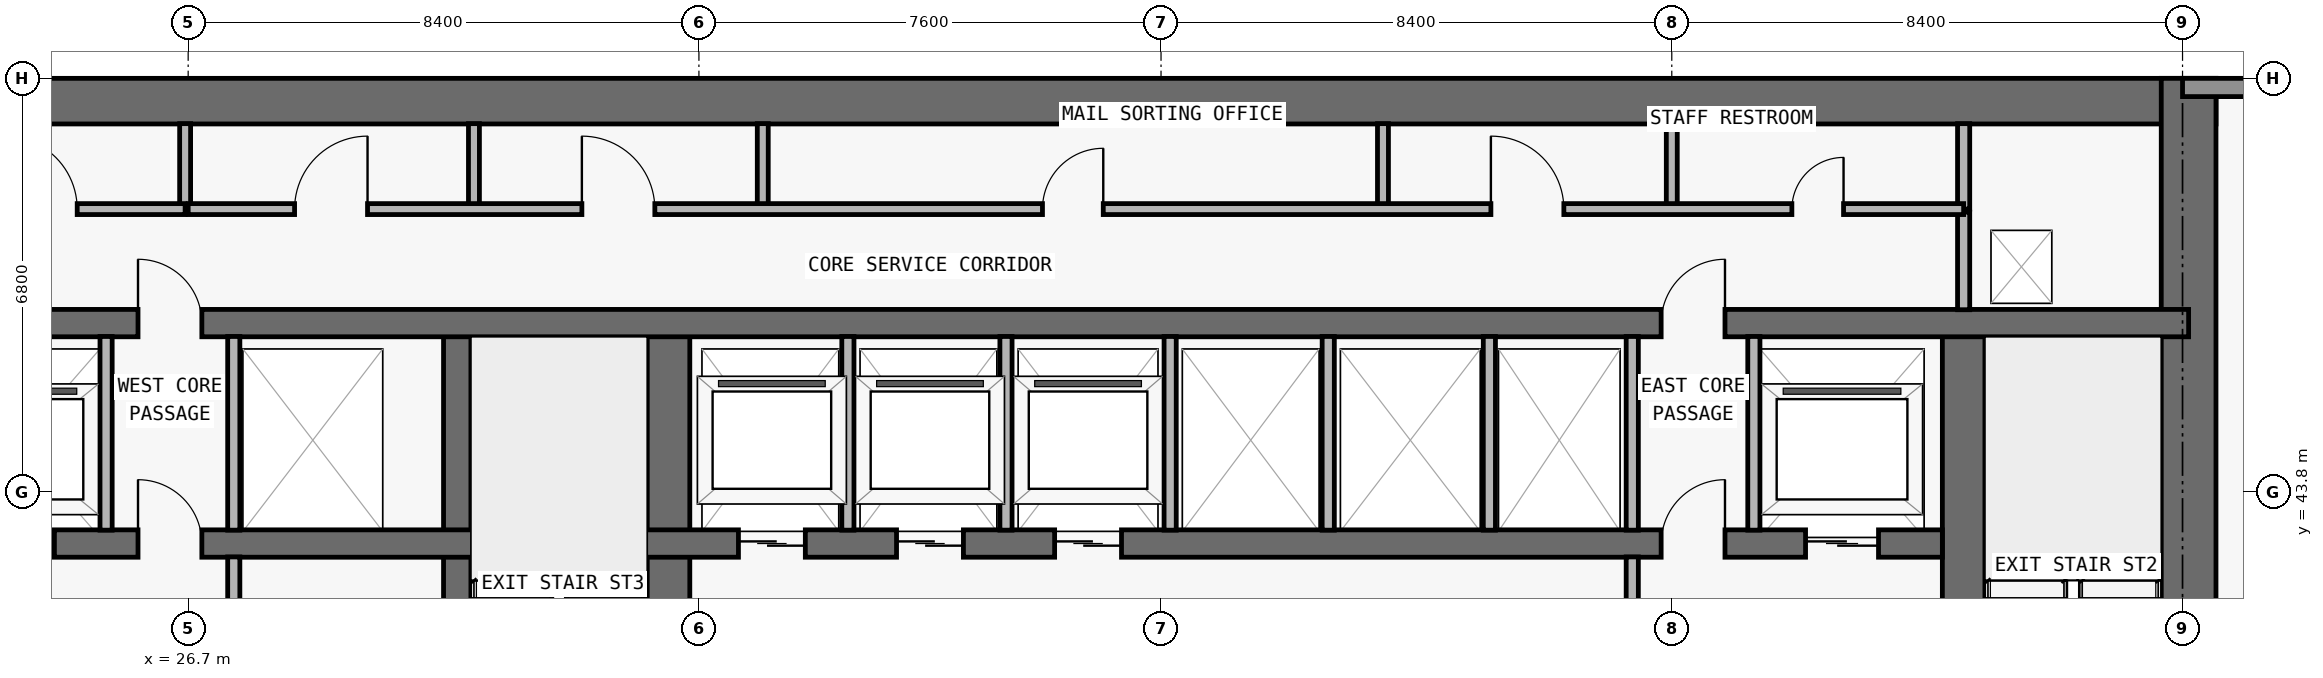
"""IFC4 building model, lengths in metres.
Left out: names, types, materials, properties, quantities, classifications, styles, units other than length and angle.
Written with IfcOpenShell. Run it as: python <this file> out.ifc"""

import sys

from ifc_helpers import new_model, si_unit, direction, frame, frame_2d, origin, place, context, subcontext, project, spatial, rectangle, extrude, element, fill, save


model = new_model("IFC4")
c1 = context("Model", 3, precision=1e-05, world=origin(), true_north=direction((0.0, 1.0)))
c2 = subcontext(c1, "Body", "Model", "MODEL_VIEW")
j1 = project(units=[si_unit("LENGTHUNIT", "METRE"), si_unit("PLANEANGLEUNIT", "RADIAN")], contexts=[c1])
p1 = place(None, origin())
s1 = spatial("IfcSite", under=j1, at=p1, CompositionType="ELEMENT")
p2 = place(p1, origin())
s2 = spatial("IfcBuilding", under=s1, at=p2, CompositionType="ELEMENT")
p3 = place(p2, frame((0.0, 0.0, 19.8)))
s3 = spatial("IfcBuildingStorey", under=s2, at=p3, CompositionType="ELEMENT", Elevation=19.8)
p4 = place(p3, frame((17.75, 50.225, 0.0), z_axis=(0.0, 0.0, 1.0), x_axis=(1.0, 0.0, 0.0)))
e1 = element("IfcWall", 1, at=p4, inside=s3, PredefinedType="SHEAR", context=c2, shape_type="SweptSolid", body=[
    extrude(rectangle(XDim=42.3, YDim=0.75, at=frame_2d((21.15, 0.0))), origin(), (0.0, 0.0, 1.0), 4.45),
])
p5 = place(p3, frame((59.6, 36.45, 0.0), z_axis=(0.0, 0.0, 1.0), x_axis=(0.0, 1.0, 0.0)))
e2 = element("IfcWall", 2, at=p5, inside=s3, PredefinedType="SHEAR", context=c2, shape_type="SweptSolid", body=[
    extrude(rectangle(XDim=14.15, YDim=0.9, at=frame_2d((7.075, 0.0))), origin(), (0.0, 0.0, 1.0), 4.45),
])
p6 = place(p3, frame((55.9, 36.9, 0.0), z_axis=(0.0, 0.0, 1.0), x_axis=(0.0, 1.0, 0.0)))
e3 = element("IfcWall", 3, at=p6, inside=s3, PredefinedType="SHEAR", context=c2, shape_type="SweptSolid", body=[
    extrude(rectangle(XDim=9.675, YDim=0.7, at=frame_2d((4.837, 0.0))), origin(), (0.0, 0.0, 1.0), 4.45),
])
p7 = place(p6, frame((0.65, 0.0, 0.0)))
e4 = element("IfcOpeningElement", 4, at=p7, cuts=e3, PredefinedType="OPENING", context=c2, shape_type="SweptSolid", body=[
    extrude(rectangle(XDim=1.1, YDim=2.15, at=frame_2d((0.55, 1.075))), frame((0.0, 0.36, 0.0), z_axis=(0.0, -1.0, 0.0), x_axis=(1.0, 0.0, 0.0)), (0.0, 0.0, 1.0), 0.72),
])
p8 = place(p3, frame((31.125, 36.9, 0.0), z_axis=(0.0, 0.0, 1.0), x_axis=(0.0, 1.0, 0.0)))
e5 = element("IfcWall", 5, at=p8, inside=s3, PredefinedType="SHEAR", context=c2, shape_type="SweptSolid", body=[
    extrude(rectangle(XDim=9.675, YDim=0.45, at=frame_2d((4.837, 0.0))), origin(), (0.0, 0.0, 1.0), 4.45),
])
p9 = place(p3, frame((34.6, 36.9, 0.0), z_axis=(0.0, 0.0, 1.0), x_axis=(0.0, 1.0, 0.0)))
e6 = element("IfcWall", 6, at=p9, inside=s3, PredefinedType="SHEAR", context=c2, shape_type="SweptSolid", body=[
    extrude(rectangle(XDim=9.675, YDim=0.7, at=frame_2d((4.837, 0.0))), origin(), (0.0, 0.0, 1.0), 4.45),
])
p10 = place(p3, frame((22.25, 42.95, 0.0), z_axis=(0.0, 0.0, 1.0), x_axis=(1.0, 0.0, 0.0)))
e7 = element("IfcWall", 7, at=p10, inside=s3, PredefinedType="SHEAR", context=c2, shape_type="SweptSolid", body=[
    extrude(rectangle(XDim=33.3, YDim=0.45, at=frame_2d((16.65, 0.0))), origin(), (0.0, 0.0, 1.0), 4.45),
])
p11 = place(p10, frame((1.05, 0.0, 0.0)))
e8 = element("IfcOpeningElement", 8, at=p11, cuts=e7, PredefinedType="OPENING", context=c2, shape_type="SweptSolid", body=[
    extrude(rectangle(XDim=1.2, YDim=2.2, at=frame_2d((0.6, 1.1))), frame((0.0, 0.235, 0.0), z_axis=(0.0, -1.0, 0.0), x_axis=(1.0, 0.0, 0.0)), (0.0, 0.0, 1.0), 0.47),
])
p12 = place(p10, frame((31.05, 0.0, 0.0)))
e9 = element("IfcOpeningElement", 9, at=p12, cuts=e7, PredefinedType="OPENING", context=c2, shape_type="SweptSolid", body=[
    extrude(rectangle(XDim=1.2, YDim=2.2, at=frame_2d((0.6, 1.1))), frame((0.0, 0.235, 0.0), z_axis=(0.0, -1.0, 0.0), x_axis=(1.0, 0.0, 0.0)), (0.0, 0.0, 1.0), 0.47),
])
p13 = place(p10, frame((13.5, 0.0, 0.0)))
e10 = element("IfcOpeningElement", 10, at=p13, cuts=e7, PredefinedType="OPENING", context=c2, shape_type="SweptSolid", body=[
    extrude(rectangle(XDim=1.1, YDim=2.2, at=frame_2d((0.55, 1.1))), frame((0.0, 0.235, 0.0), z_axis=(0.0, -1.0, 0.0), x_axis=(1.0, 0.0, 0.0)), (0.0, 0.0, 1.0), 0.47),
])
p14 = place(p10, frame((16.1, 0.0, 0.0)))
e11 = element("IfcOpeningElement", 11, at=p14, cuts=e7, PredefinedType="OPENING", context=c2, shape_type="SweptSolid", body=[
    extrude(rectangle(XDim=1.1, YDim=2.2, at=frame_2d((0.55, 1.1))), frame((0.0, 0.235, 0.0), z_axis=(0.0, -1.0, 0.0), x_axis=(1.0, 0.0, 0.0)), (0.0, 0.0, 1.0), 0.47),
])
p15 = place(p10, frame((18.7, 0.0, 0.0)))
e12 = element("IfcOpeningElement", 12, at=p15, cuts=e7, PredefinedType="OPENING", context=c2, shape_type="SweptSolid", body=[
    extrude(rectangle(XDim=1.1, YDim=2.2, at=frame_2d((0.55, 1.1))), frame((0.0, 0.235, 0.0), z_axis=(0.0, -1.0, 0.0), x_axis=(1.0, 0.0, 0.0)), (0.0, 0.0, 1.0), 0.47),
])
p16 = place(p10, frame((3.625, 0.0, 0.0)))
e13 = element("IfcOpeningElement", 13, at=p16, cuts=e7, PredefinedType="OPENING", context=c2, shape_type="SweptSolid", body=[
    extrude(rectangle(XDim=1.05, YDim=2.15, at=frame_2d((0.525, 1.075))), frame((0.0, 0.235, 0.0), z_axis=(0.0, -1.0, 0.0), x_axis=(1.0, 0.0, 0.0)), (0.0, 0.0, 1.0), 0.47),
])
p17 = place(p10, frame((28.675, 0.0, 0.0)))
e14 = element("IfcOpeningElement", 14, at=p17, cuts=e7, PredefinedType="OPENING", context=c2, shape_type="SweptSolid", body=[
    extrude(rectangle(XDim=1.05, YDim=2.15, at=frame_2d((0.525, 1.075))), frame((0.0, 0.235, 0.0), z_axis=(0.0, -1.0, 0.0), x_axis=(1.0, 0.0, 0.0)), (0.0, 0.0, 1.0), 0.47),
])
p18 = place(p3, frame((18.2, 46.575, 0.0), z_axis=(0.0, 0.0, 1.0), x_axis=(1.0, 0.0, 0.0)))
e15 = element("IfcWall", 15, at=p18, inside=s3, PredefinedType="SHEAR", context=c2, shape_type="SweptSolid", body=[
    extrude(rectangle(XDim=41.4, YDim=0.45, at=frame_2d((20.7, 0.0))), origin(), (0.0, 0.0, 1.0), 4.45),
])
p19 = place(p18, frame((7.675, 0.0, 0.0)))
e16 = element("IfcOpeningElement", 16, at=p19, cuts=e15, PredefinedType="OPENING", context=c2, shape_type="SweptSolid", body=[
    extrude(rectangle(XDim=1.05, YDim=2.15, at=frame_2d((0.525, 1.075))), frame((0.0, 0.235, 0.0), z_axis=(0.0, -1.0, 0.0), x_axis=(1.0, 0.0, 0.0)), (0.0, 0.0, 1.0), 0.47),
])
p20 = place(p18, frame((32.725, 0.0, 0.0)))
e17 = element("IfcOpeningElement", 17, at=p20, cuts=e15, PredefinedType="OPENING", context=c2, shape_type="SweptSolid", body=[
    extrude(rectangle(XDim=1.05, YDim=2.15, at=frame_2d((0.525, 1.075))), frame((0.0, 0.235, 0.0), z_axis=(0.0, -1.0, 0.0), x_axis=(1.0, 0.0, 0.0)), (0.0, 0.0, 1.0), 0.47),
])
p21 = place(p3, frame((59.5, 50.45, 0.0), z_axis=(0.0, 0.0, 1.0), x_axis=(1.0, 0.0, 0.0)))
e18 = element("IfcWall", 18, at=p21, inside=s3, PredefinedType="STANDARD", context=c2, shape_type="SweptSolid", body=[
    extrude(rectangle(XDim=14.65, YDim=0.3, at=frame_2d((7.325, 0.0))), origin(), (0.0, 0.0, 1.0), 4.45),
])
p22 = place(p21, frame((6.225, 0.0, 0.85)))
e19 = element("IfcOpeningElement", 19, at=p22, cuts=e18, PredefinedType="OPENING", context=c2, shape_type="SweptSolid", body=[
    extrude(rectangle(XDim=2.2, YDim=1.55, at=frame_2d((1.1, 0.775))), frame((0.0, 0.16, 0.0), z_axis=(0.0, -1.0, 0.0), x_axis=(1.0, 0.0, 0.0)), (0.0, 0.0, 1.0), 0.32),
])
p23 = place(p3, frame((25.35, 43.17, 0.0), z_axis=(0.0, 0.0, 1.0), x_axis=(0.0, 1.0, 0.0)))
e20 = element("IfcWall", 20, at=p23, inside=s3, PredefinedType="PARTITIONING", context=c2, shape_type="SweptSolid", body=[
    extrude(rectangle(XDim=3.185, YDim=0.2, at=frame_2d((1.593, 0.0))), origin(), (0.0, 0.0, 1.0), 4.45),
])
p24 = place(p3, frame((26.65, 48.45, 0.0), z_axis=(0.0, 0.0, 1.0), x_axis=(0.0, 1.0, 0.0)))
e21 = element("IfcWall", 21, at=p24, inside=s3, PredefinedType="PARTITIONING", context=c2, shape_type="SweptSolid", body=[
    extrude(rectangle(XDim=1.405, YDim=0.18, at=frame_2d((0.703, 0.0))), origin(), (0.0, 0.0, 1.0), 4.45),
])
p25 = place(p3, frame((27.45, 37.345, 0.0), z_axis=(0.0, 0.0, 1.0), x_axis=(0.0, 1.0, 0.0)))
e22 = element("IfcWall", 22, at=p25, inside=s3, PredefinedType="PARTITIONING", context=c2, shape_type="SweptSolid", body=[
    extrude(rectangle(XDim=5.385, YDim=0.2, at=frame_2d((2.692, 0.0))), origin(), (0.0, 0.0, 1.0), 4.45),
])
p26 = place(p3, frame((27.45, 43.17, 0.0), z_axis=(0.0, 0.0, 1.0), x_axis=(0.0, 1.0, 0.0)))
e23 = element("IfcWall", 23, at=p26, inside=s3, PredefinedType="PARTITIONING", context=c2, shape_type="SweptSolid", body=[
    extrude(rectangle(XDim=3.185, YDim=0.2, at=frame_2d((1.593, 0.0))), origin(), (0.0, 0.0, 1.0), 4.45),
])
for number, where, z_axis, x_axis in (
    (24, (31.4, 48.45, 0.0), (0.0, 0.0, 1.0), (0.0, 1.0, 0.0)),
    (25, (36.15, 48.45, 0.0), (0.0, 0.0, 1.0), (0.0, 1.0, 0.0)),
):
    element("IfcWall", number, at=place(p3, frame(where, z_axis=z_axis, x_axis=x_axis)), inside=s3, PredefinedType="PARTITIONING", context=c2, shape_type="SweptSolid", body=[
        extrude(rectangle(XDim=1.405, YDim=0.18, at=frame_2d((0.703, 0.0))), origin(), (0.0, 0.0, 1.0), 4.45),
    ])
for number, where, z_axis, x_axis in (
    (26, (37.55, 43.17, 0.0), (0.0, 0.0, 1.0), (0.0, 1.0, 0.0)),
    (27, (40.15, 43.17, 0.0), (0.0, 0.0, 1.0), (0.0, 1.0, 0.0)),
    (28, (42.85, 43.17, 0.0), (0.0, 0.0, 1.0), (0.0, 1.0, 0.0)),
    (29, (45.45, 43.17, 0.0), (0.0, 0.0, 1.0), (0.0, 1.0, 0.0)),
):
    element("IfcWall", number, at=place(p3, frame(where, z_axis=z_axis, x_axis=x_axis)), inside=s3, PredefinedType="PARTITIONING", context=c2, shape_type="SweptSolid", body=[
        extrude(rectangle(XDim=3.185, YDim=0.2, at=frame_2d((1.593, 0.0))), origin(), (0.0, 0.0, 1.0), 4.45),
    ])
p27 = place(p3, frame((46.35, 48.45, 0.0), z_axis=(0.0, 0.0, 1.0), x_axis=(0.0, 1.0, 0.0)))
e30 = element("IfcWall", 30, at=p27, inside=s3, PredefinedType="PARTITIONING", context=c2, shape_type="SweptSolid", body=[
    extrude(rectangle(XDim=1.405, YDim=0.18, at=frame_2d((0.703, 0.0))), origin(), (0.0, 0.0, 1.0), 4.45),
])
p28 = place(p3, frame((48.1, 43.17, 0.0), z_axis=(0.0, 0.0, 1.0), x_axis=(0.0, 1.0, 0.0)))
e31 = element("IfcWall", 31, at=p28, inside=s3, PredefinedType="PARTITIONING", context=c2, shape_type="SweptSolid", body=[
    extrude(rectangle(XDim=3.185, YDim=0.2, at=frame_2d((1.593, 0.0))), origin(), (0.0, 0.0, 1.0), 4.45),
])
p29 = place(p3, frame((50.45, 37.345, 0.0), z_axis=(0.0, 0.0, 1.0), x_axis=(0.0, 1.0, 0.0)))
e32 = element("IfcWall", 32, at=p29, inside=s3, PredefinedType="PARTITIONING", context=c2, shape_type="SweptSolid", body=[
    extrude(rectangle(XDim=5.385, YDim=0.2, at=frame_2d((2.692, 0.0))), origin(), (0.0, 0.0, 1.0), 4.45),
])
p30 = place(p3, frame((50.45, 43.17, 0.0), z_axis=(0.0, 0.0, 1.0), x_axis=(0.0, 1.0, 0.0)))
e33 = element("IfcWall", 33, at=p30, inside=s3, PredefinedType="PARTITIONING", context=c2, shape_type="SweptSolid", body=[
    extrude(rectangle(XDim=3.185, YDim=0.2, at=frame_2d((1.593, 0.0))), origin(), (0.0, 0.0, 1.0), 4.45),
])
p31 = place(p3, frame((51.1, 48.45, 0.0), z_axis=(0.0, 0.0, 1.0), x_axis=(0.0, 1.0, 0.0)))
e34 = element("IfcWall", 34, at=p31, inside=s3, PredefinedType="PARTITIONING", context=c2, shape_type="SweptSolid", body=[
    extrude(rectangle(XDim=1.405, YDim=0.18, at=frame_2d((0.703, 0.0))), origin(), (0.0, 0.0, 1.0), 4.45),
])
p32 = place(p3, frame((52.45, 43.17, 0.0), z_axis=(0.0, 0.0, 1.0), x_axis=(0.0, 1.0, 0.0)))
e35 = element("IfcWall", 35, at=p32, inside=s3, PredefinedType="PARTITIONING", context=c2, shape_type="SweptSolid", body=[
    extrude(rectangle(XDim=3.185, YDim=0.2, at=frame_2d((1.593, 0.0))), origin(), (0.0, 0.0, 1.0), 4.45),
])
p33 = place(p3, frame((55.9, 46.795, 0.0), z_axis=(0.0, 0.0, 1.0), x_axis=(0.0, 1.0, 0.0)))
e36 = element("IfcWall", 36, at=p33, inside=s3, PredefinedType="PARTITIONING", context=c2, shape_type="SweptSolid", body=[
    extrude(rectangle(XDim=1.605, YDim=0.2, at=frame_2d((0.802, 0.0))), origin(), (0.0, 0.0, 1.0), 4.45),
])
p34 = place(p3, frame((55.9, 48.45, 0.0), z_axis=(0.0, 0.0, 1.0), x_axis=(0.0, 1.0, 0.0)))
e37 = element("IfcWall", 37, at=p34, inside=s3, PredefinedType="PARTITIONING", context=c2, shape_type="SweptSolid", body=[
    extrude(rectangle(XDim=1.405, YDim=0.2, at=frame_2d((0.703, 0.0))), origin(), (0.0, 0.0, 1.0), 4.45),
])
p35 = place(p3, frame((21.9, 48.45, 0.0), z_axis=(0.0, 0.0, 1.0), x_axis=(1.0, 0.0, 0.0)))
e38 = element("IfcWall", 38, at=p35, inside=s3, PredefinedType="PARTITIONING", context=c2, shape_type="SweptSolid", body=[
    extrude(rectangle(XDim=4.75, YDim=0.18, at=frame_2d((2.375, 0.0))), origin(), (0.0, 0.0, 1.0), 4.45),
])
p36 = place(p35, frame((1.775, 0.0, 0.0)))
e39 = element("IfcOpeningElement", 39, at=p36, cuts=e38, PredefinedType="OPENING", context=c2, shape_type="SweptSolid", body=[
    extrude(rectangle(XDim=1.2, YDim=2.2, at=frame_2d((0.6, 1.1))), frame((0.0, 0.1, 0.0), z_axis=(0.0, -1.0, 0.0), x_axis=(1.0, 0.0, 0.0)), (0.0, 0.0, 1.0), 0.2),
])
p37 = place(p3, frame((26.7, 48.45, 0.0), z_axis=(0.0, 0.0, 1.0), x_axis=(1.0, 0.0, 0.0)))
e40 = element("IfcWall", 40, at=p37, inside=s3, PredefinedType="PARTITIONING", context=c2, shape_type="SweptSolid", body=[
    extrude(rectangle(XDim=29.2, YDim=0.18, at=frame_2d((14.6, 0.0))), origin(), (0.0, 0.0, 1.0), 4.45),
])
p38 = place(p37, frame((1.75, 0.0, 0.0)))
e41 = element("IfcOpeningElement", 41, at=p38, cuts=e40, PredefinedType="OPENING", context=c2, shape_type="SweptSolid", body=[
    extrude(rectangle(XDim=1.2, YDim=2.2, at=frame_2d((0.6, 1.1))), frame((0.0, 0.1, 0.0), z_axis=(0.0, -1.0, 0.0), x_axis=(1.0, 0.0, 0.0)), (0.0, 0.0, 1.0), 0.2),
])
p39 = place(p37, frame((6.475, 0.0, 0.0)))
e42 = element("IfcOpeningElement", 42, at=p39, cuts=e40, PredefinedType="OPENING", context=c2, shape_type="SweptSolid", body=[
    extrude(rectangle(XDim=1.2, YDim=2.2, at=frame_2d((0.6, 1.1))), frame((0.0, 0.1, 0.0), z_axis=(0.0, -1.0, 0.0), x_axis=(1.0, 0.0, 0.0)), (0.0, 0.0, 1.0), 0.2),
])
p40 = place(p37, frame((14.05, 0.0, 0.0)))
e43 = element("IfcOpeningElement", 43, at=p40, cuts=e40, PredefinedType="OPENING", context=c2, shape_type="SweptSolid", body=[
    extrude(rectangle(XDim=1.0, YDim=2.2, at=frame_2d((0.5, 1.1))), frame((0.0, 0.1, 0.0), z_axis=(0.0, -1.0, 0.0), x_axis=(1.0, 0.0, 0.0)), (0.0, 0.0, 1.0), 0.2),
])
p41 = place(p37, frame((21.425, 0.0, 0.0)))
e44 = element("IfcOpeningElement", 44, at=p41, cuts=e40, PredefinedType="OPENING", context=c2, shape_type="SweptSolid", body=[
    extrude(rectangle(XDim=1.2, YDim=2.2, at=frame_2d((0.6, 1.1))), frame((0.0, 0.1, 0.0), z_axis=(0.0, -1.0, 0.0), x_axis=(1.0, 0.0, 0.0)), (0.0, 0.0, 1.0), 0.2),
])
p42 = place(p37, frame((26.375, 0.0, 0.0)))
e45 = element("IfcOpeningElement", 45, at=p42, cuts=e40, PredefinedType="OPENING", context=c2, shape_type="SweptSolid", body=[
    extrude(rectangle(XDim=0.85, YDim=2.1, at=frame_2d((0.425, 1.05))), frame((0.0, 0.1, 0.0), z_axis=(0.0, -1.0, 0.0), x_axis=(1.0, 0.0, 0.0)), (0.0, 0.0, 1.0), 0.2),
])
p43 = place(p11, origin())
e46 = element("IfcDoor", 46, at=p43, inside=s3, OperationType="DOUBLE_DOOR_SLIDING", PredefinedType="DOOR", context=c2, shape_type="SweptSolid", body=[
    extrude(rectangle(XDim=1.2, YDim=2.2, at=frame_2d((0.6, 1.1))), frame((0.0, 0.025, 0.0), z_axis=(0.0, -1.0, 0.0), x_axis=(1.0, 0.0, 0.0)), (0.0, 0.0, 1.0), 0.05),
])
fill(e8, e46)
p44 = place(p12, origin())
e47 = element("IfcDoor", 47, at=p44, inside=s3, OperationType="DOUBLE_DOOR_SLIDING", PredefinedType="DOOR", context=c2, shape_type="SweptSolid", body=[
    extrude(rectangle(XDim=1.2, YDim=2.2, at=frame_2d((0.6, 1.1))), frame((0.0, 0.025, 0.0), z_axis=(0.0, -1.0, 0.0), x_axis=(1.0, 0.0, 0.0)), (0.0, 0.0, 1.0), 0.05),
])
fill(e9, e47)
p45 = place(p13, origin())
e48 = element("IfcDoor", 48, at=p45, inside=s3, OperationType="DOUBLE_DOOR_SLIDING", PredefinedType="DOOR", context=c2, shape_type="SweptSolid", body=[
    extrude(rectangle(XDim=1.1, YDim=2.2, at=frame_2d((0.55, 1.1))), frame((0.0, 0.025, 0.0), z_axis=(0.0, -1.0, 0.0), x_axis=(1.0, 0.0, 0.0)), (0.0, 0.0, 1.0), 0.05),
])
fill(e10, e48)
p46 = place(p14, origin())
e49 = element("IfcDoor", 49, at=p46, inside=s3, OperationType="DOUBLE_DOOR_SLIDING", PredefinedType="DOOR", context=c2, shape_type="SweptSolid", body=[
    extrude(rectangle(XDim=1.1, YDim=2.2, at=frame_2d((0.55, 1.1))), frame((0.0, 0.025, 0.0), z_axis=(0.0, -1.0, 0.0), x_axis=(1.0, 0.0, 0.0)), (0.0, 0.0, 1.0), 0.05),
])
fill(e11, e49)
p47 = place(p15, origin())
e50 = element("IfcDoor", 50, at=p47, inside=s3, OperationType="DOUBLE_DOOR_SLIDING", PredefinedType="DOOR", context=c2, shape_type="SweptSolid", body=[
    extrude(rectangle(XDim=1.1, YDim=2.2, at=frame_2d((0.55, 1.1))), frame((0.0, 0.025, 0.0), z_axis=(0.0, -1.0, 0.0), x_axis=(1.0, 0.0, 0.0)), (0.0, 0.0, 1.0), 0.05),
])
fill(e12, e50)
p48 = place(p16, origin())
e51 = element("IfcDoor", 51, at=p48, inside=s3, OperationType="SINGLE_SWING_LEFT", PredefinedType="DOOR", context=c2, shape_type="SweptSolid", body=[
    extrude(rectangle(XDim=1.05, YDim=2.15, at=frame_2d((0.525, 1.075))), frame((0.0, 0.025, 0.0), z_axis=(0.0, -1.0, 0.0), x_axis=(1.0, 0.0, 0.0)), (0.0, 0.0, 1.0), 0.05),
])
fill(e13, e51)
p49 = place(p17, origin())
e52 = element("IfcDoor", 52, at=p49, inside=s3, OperationType="SINGLE_SWING_RIGHT", PredefinedType="DOOR", context=c2, shape_type="SweptSolid", body=[
    extrude(rectangle(XDim=1.05, YDim=2.15, at=frame_2d((0.525, 1.075))), frame((0.0, 0.025, 0.0), z_axis=(0.0, -1.0, 0.0), x_axis=(1.0, 0.0, 0.0)), (0.0, 0.0, 1.0), 0.05),
])
fill(e14, e52)
p50 = place(p19, origin())
e53 = element("IfcDoor", 53, at=p50, inside=s3, OperationType="SINGLE_SWING_LEFT", PredefinedType="DOOR", context=c2, shape_type="SweptSolid", body=[
    extrude(rectangle(XDim=1.05, YDim=2.15, at=frame_2d((0.525, 1.075))), frame((0.0, 0.025, 0.0), z_axis=(0.0, -1.0, 0.0), x_axis=(1.0, 0.0, 0.0)), (0.0, 0.0, 1.0), 0.05),
])
fill(e16, e53)
p51 = place(p20, origin())
e54 = element("IfcDoor", 54, at=p51, inside=s3, OperationType="SINGLE_SWING_RIGHT", PredefinedType="DOOR", context=c2, shape_type="SweptSolid", body=[
    extrude(rectangle(XDim=1.05, YDim=2.15, at=frame_2d((0.525, 1.075))), frame((0.0, 0.025, 0.0), z_axis=(0.0, -1.0, 0.0), x_axis=(1.0, 0.0, 0.0)), (0.0, 0.0, 1.0), 0.05),
])
fill(e17, e54)
p52 = place(p36, origin())
e55 = element("IfcDoor", 55, at=p52, inside=s3, OperationType="SINGLE_SWING_LEFT", PredefinedType="DOOR", context=c2, shape_type="SweptSolid", body=[
    extrude(rectangle(XDim=1.2, YDim=2.2, at=frame_2d((0.6, 1.1))), frame((0.0, 0.025, 0.0), z_axis=(0.0, -1.0, 0.0), x_axis=(1.0, 0.0, 0.0)), (0.0, 0.0, 1.0), 0.05),
])
fill(e39, e55)
p53 = place(p38, origin())
e56 = element("IfcDoor", 56, at=p53, inside=s3, OperationType="SINGLE_SWING_RIGHT", PredefinedType="DOOR", context=c2, shape_type="SweptSolid", body=[
    extrude(rectangle(XDim=1.2, YDim=2.2, at=frame_2d((0.6, 1.1))), frame((0.0, 0.025, 0.0), z_axis=(0.0, -1.0, 0.0), x_axis=(1.0, 0.0, 0.0)), (0.0, 0.0, 1.0), 0.05),
])
fill(e41, e56)
p54 = place(p39, origin())
e57 = element("IfcDoor", 57, at=p54, inside=s3, OperationType="SINGLE_SWING_LEFT", PredefinedType="DOOR", context=c2, shape_type="SweptSolid", body=[
    extrude(rectangle(XDim=1.2, YDim=2.2, at=frame_2d((0.6, 1.1))), frame((0.0, 0.025, 0.0), z_axis=(0.0, -1.0, 0.0), x_axis=(1.0, 0.0, 0.0)), (0.0, 0.0, 1.0), 0.05),
])
fill(e42, e57)
p55 = place(p40, origin())
e58 = element("IfcDoor", 58, at=p55, inside=s3, OperationType="SINGLE_SWING_RIGHT", PredefinedType="DOOR", context=c2, shape_type="SweptSolid", body=[
    extrude(rectangle(XDim=1.0, YDim=2.2, at=frame_2d((0.5, 1.1))), frame((0.0, 0.025, 0.0), z_axis=(0.0, -1.0, 0.0), x_axis=(1.0, 0.0, 0.0)), (0.0, 0.0, 1.0), 0.05),
])
fill(e43, e58)
p56 = place(p41, origin())
e59 = element("IfcDoor", 59, at=p56, inside=s3, OperationType="SINGLE_SWING_LEFT", PredefinedType="DOOR", context=c2, shape_type="SweptSolid", body=[
    extrude(rectangle(XDim=1.2, YDim=2.2, at=frame_2d((0.6, 1.1))), frame((0.0, 0.025, 0.0), z_axis=(0.0, -1.0, 0.0), x_axis=(1.0, 0.0, 0.0)), (0.0, 0.0, 1.0), 0.05),
])
fill(e44, e59)
p57 = place(p42, origin())
e60 = element("IfcDoor", 60, at=p57, inside=s3, OperationType="SINGLE_SWING_RIGHT", PredefinedType="DOOR", context=c2, shape_type="SweptSolid", body=[
    extrude(rectangle(XDim=0.85, YDim=2.1, at=frame_2d((0.425, 1.05))), frame((0.0, 0.025, 0.0), z_axis=(0.0, -1.0, 0.0), x_axis=(1.0, 0.0, 0.0)), (0.0, 0.0, 1.0), 0.05),
])
fill(e45, e60)
save(model, sys.argv[1])
